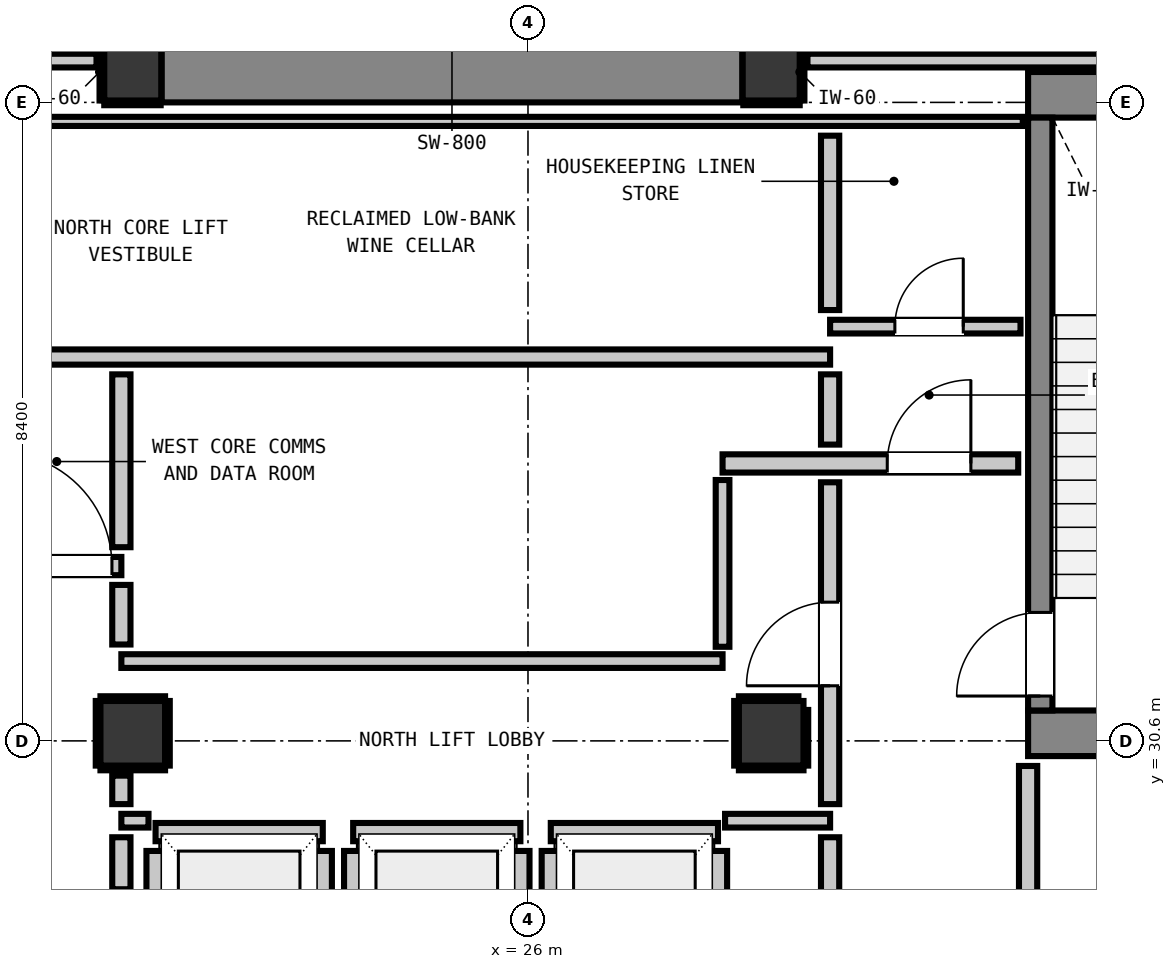
"""IFC4 building model, lengths in metres.
Left out: names, types, materials, properties, quantities, classifications, styles, units other than length and angle.
Written with IfcOpenShell. Run it as: python <this file> out.ifc"""

import sys

from ifc_helpers import new_model, si_unit, direction, frame, frame_2d, origin, origin_2d, place, context, subcontext, project, spatial, rectangle, extrude, element, fill, save


model = new_model("IFC4")
c1 = context("Model", 3, precision=1e-05, world=origin(), true_north=direction((0.0, 1.0)))
c2 = subcontext(c1, "Body", "Model", "MODEL_VIEW")
j1 = project(units=[si_unit("LENGTHUNIT", "METRE"), si_unit("PLANEANGLEUNIT", "RADIAN")], contexts=[c1])
p1 = place(None, origin())
s1 = spatial("IfcSite", under=j1, at=p1, CompositionType="ELEMENT")
p2 = place(p1, origin())
s2 = spatial("IfcBuilding", under=s1, at=p2, CompositionType="ELEMENT")
p3 = place(p2, frame((0.0, 0.0, 172.48)))
s3 = spatial("IfcBuildingStorey", under=s2, at=p3, CompositionType="ELEMENT", Elevation=172.48)
for number, where, z_axis, x_axis in (
    (1, (20.8, 39.4, 0.0), (0.0, 0.0, 1.0), (1.0, 0.0, 0.0)),
    (2, (29.2, 39.4, 0.0), (0.0, 0.0, 1.0), (1.0, 0.0, 0.0)),
):
    element("IfcColumn", number, at=place(p3, frame(where, z_axis=z_axis, x_axis=x_axis)), inside=s3, PredefinedType="COLUMN", context=c2, shape_type="SweptSolid", body=[
        extrude(rectangle(XDim=0.75, YDim=0.75, at=origin_2d()), origin(), (0.0, 0.0, 1.0), 4.4),
    ])
p4 = place(p3, frame((32.58, 39.1, 0.0), z_axis=(0.0, 0.0, 1.0), x_axis=(1.0, 0.0, 0.0)))
e3 = element("IfcWall", 3, at=p4, inside=s3, PredefinedType="SHEAR", context=c2, shape_type="SweptSolid", body=[
    extrude(rectangle(XDim=4.08, YDim=0.6, at=frame_2d((2.04, 0.0))), origin(), (0.0, 0.0, 1.0), 4.4),
])
p5 = place(p3, frame((32.58, 30.7, 0.0), z_axis=(0.0, 0.0, 1.0), x_axis=(1.0, 0.0, 0.0)))
e4 = element("IfcWall", 4, at=p5, inside=s3, PredefinedType="SHEAR", context=c2, shape_type="SweptSolid", body=[
    extrude(rectangle(XDim=3.54, YDim=0.6, at=frame_2d((1.77, 0.0))), origin(), (0.0, 0.0, 1.0), 4.4),
])
p6 = place(p3, frame((21.18, 39.4, 0.0), z_axis=(0.0, 0.0, 1.0), x_axis=(1.0, 0.0, 0.0)))
e5 = element("IfcWall", 5, at=p6, inside=s3, PredefinedType="SHEAR", context=c2, shape_type="SweptSolid", body=[
    extrude(rectangle(XDim=7.64, YDim=0.8, at=frame_2d((3.82, 0.0))), origin(), (0.0, 0.0, 1.0), 4.4),
])
p7 = place(p3, frame((32.74, 31.0, 0.0), z_axis=(0.0, 0.0, 1.0), x_axis=(0.0, 1.0, 0.0)))
e6 = element("IfcWall", 6, at=p7, inside=s3, PredefinedType="SHEAR", context=c2, shape_type="SweptSolid", body=[
    extrude(rectangle(XDim=7.8, YDim=0.32, at=frame_2d((3.9, 0.0))), origin(), (0.0, 0.0, 1.0), 4.4),
])
p8 = place(p7, frame((0.19, 0.0, 0.0)))
e7 = element("IfcOpeningElement", 7, at=p8, cuts=e6, PredefinedType="OPENING", context=c2, shape_type="SweptSolid", body=[
    extrude(rectangle(XDim=1.1, YDim=2.15, at=frame_2d((0.55, 1.075))), frame((0.0, 0.17, 0.0), z_axis=(0.0, -1.0, 0.0), x_axis=(1.0, 0.0, 0.0)), (0.0, 0.0, 1.0), 0.34),
])
for number, where, z_axis, x_axis in (
    (8, (20.8, 30.7, 0.0), (0.0, 0.0, 1.0), (1.0, 0.0, 0.0)),
    (9, (29.2, 30.7, 0.0), (0.0, 0.0, 1.0), (1.0, 0.0, 0.0)),
):
    element("IfcColumn", number, at=place(p3, frame(where, z_axis=z_axis, x_axis=x_axis)), inside=s3, PredefinedType="COLUMN", context=c2, shape_type="SweptSolid", body=[
        extrude(rectangle(XDim=0.85, YDim=0.85, at=origin_2d()), origin(), (0.0, 0.0, 1.0), 4.4),
    ])
p9 = place(p3, frame((21.1, 29.4, 0.0), z_axis=(0.0, 0.0, 1.0), x_axis=(1.0, 0.0, 0.0)))
e10 = element("IfcWall", 10, at=p9, inside=s3, PredefinedType="PARTITIONING", context=c2, shape_type="SweptSolid", body=[
    extrude(rectangle(XDim=2.2, YDim=0.24, at=frame_2d((1.1, 0.0))), origin(), (0.0, 0.0, 1.0), 4.16),
])
p10 = place(p3, frame((21.1, 27.048, 0.0), z_axis=(0.0, 0.0, 1.0), x_axis=(0.0, 1.0, 0.0)))
e11 = element("IfcWall", 11, at=p10, inside=s3, PredefinedType="PARTITIONING", context=c2, shape_type="SweptSolid", body=[
    extrude(rectangle(XDim=2.104, YDim=0.24, at=frame_2d((1.052, 0.0))), origin(), (0.0, 0.0, 1.0), 3.395),
])
p11 = place(p3, frame((23.3, 27.048, 0.0), z_axis=(0.0, 0.0, 1.0), x_axis=(0.0, 1.0, 0.0)))
e12 = element("IfcWall", 12, at=p11, inside=s3, PredefinedType="PARTITIONING", context=c2, shape_type="SweptSolid", body=[
    extrude(rectangle(XDim=2.104, YDim=0.24, at=frame_2d((1.052, 0.0))), origin(), (0.0, 0.0, 1.0), 4.16),
])
p12 = place(p3, frame((23.7, 29.4, 0.0), z_axis=(0.0, 0.0, 1.0), x_axis=(1.0, 0.0, 0.0)))
e13 = element("IfcWall", 13, at=p12, inside=s3, PredefinedType="PARTITIONING", context=c2, shape_type="SweptSolid", body=[
    extrude(rectangle(XDim=2.2, YDim=0.24, at=frame_2d((1.1, 0.0))), origin(), (0.0, 0.0, 1.0), 4.16),
])
for number, where, z_axis, x_axis in (
    (14, (23.7, 27.048, 0.0), (0.0, 0.0, 1.0), (0.0, 1.0, 0.0)),
    (15, (25.9, 27.048, 0.0), (0.0, 0.0, 1.0), (0.0, 1.0, 0.0)),
):
    element("IfcWall", number, at=place(p3, frame(where, z_axis=z_axis, x_axis=x_axis)), inside=s3, PredefinedType="PARTITIONING", context=c2, shape_type="SweptSolid", body=[
        extrude(rectangle(XDim=2.104, YDim=0.24, at=frame_2d((1.052, 0.0))), origin(), (0.0, 0.0, 1.0), 4.16),
    ])
p13 = place(p3, frame((26.3, 29.4, 0.0), z_axis=(0.0, 0.0, 1.0), x_axis=(1.0, 0.0, 0.0)))
e16 = element("IfcWall", 16, at=p13, inside=s3, PredefinedType="PARTITIONING", context=c2, shape_type="SweptSolid", body=[
    extrude(rectangle(XDim=2.2, YDim=0.24, at=frame_2d((1.1, 0.0))), origin(), (0.0, 0.0, 1.0), 4.16),
])
p14 = place(p3, frame((26.3, 27.048, 0.0), z_axis=(0.0, 0.0, 1.0), x_axis=(0.0, 1.0, 0.0)))
e17 = element("IfcWall", 17, at=p14, inside=s3, PredefinedType="PARTITIONING", context=c2, shape_type="SweptSolid", body=[
    extrude(rectangle(XDim=2.104, YDim=0.24, at=frame_2d((1.052, 0.0))), origin(), (0.0, 0.0, 1.0), 4.16),
])
p15 = place(p3, frame((28.5, 27.33, 0.0), z_axis=(0.0, 0.0, 1.0), x_axis=(0.0, 1.0, 0.0)))
e18 = element("IfcWall", 18, at=p15, inside=s3, PredefinedType="PARTITIONING", context=c2, shape_type="SweptSolid", body=[
    extrude(rectangle(XDim=1.822, YDim=0.24, at=frame_2d((0.911, 0.0))), origin(), (0.0, 0.0, 1.0), 4.16),
])
p16 = place(p3, frame((17.45, 32.9, 0.0), z_axis=(0.0, 0.0, 1.0), x_axis=(1.0, 0.0, 0.0)))
e19 = element("IfcWall", 19, at=p16, inside=s3, PredefinedType="PARTITIONING", context=c2, shape_type="SweptSolid", body=[
    extrude(rectangle(XDim=3.2, YDim=0.24, at=frame_2d((1.6, 0.0))), origin(), (0.0, 0.0, 1.0), 4.16),
])
p17 = place(p16, frame((0.159, 0.0, 0.0)))
e20 = element("IfcOpeningElement", 20, at=p17, cuts=e19, PredefinedType="OPENING", context=c2, shape_type="SweptSolid", body=[
    extrude(rectangle(XDim=1.1, YDim=2.15, at=frame_2d((0.55, 1.075))), frame((0.0, 0.13, 0.0), z_axis=(0.0, -1.0, 0.0), x_axis=(1.0, 0.0, 0.0)), (0.0, 0.0, 1.0), 0.26),
])
p18 = place(p16, frame((1.576, 0.0, 0.0)))
e21 = element("IfcOpeningElement", 21, at=p18, cuts=e19, PredefinedType="OPENING", context=c2, shape_type="SweptSolid", body=[
    extrude(rectangle(XDim=1.5, YDim=2.15, at=frame_2d((0.75, 1.075))), frame((0.0, 0.13, 0.0), z_axis=(0.0, -1.0, 0.0), x_axis=(1.0, 0.0, 0.0)), (0.0, 0.0, 1.0), 0.26),
])
p19 = place(p3, frame((28.56, 34.25, 0.0), z_axis=(0.0, 0.0, 1.0), x_axis=(1.0, 0.0, 0.0)))
e22 = element("IfcWall", 22, at=p19, inside=s3, PredefinedType="PARTITIONING", context=c2, shape_type="SweptSolid", body=[
    extrude(rectangle(XDim=3.89, YDim=0.24, at=frame_2d((1.945, 0.0))), origin(), (0.0, 0.0, 1.0), 4.16),
])
p20 = place(p19, frame((2.167, 0.0, 0.0)))
e23 = element("IfcOpeningElement", 23, at=p20, cuts=e22, PredefinedType="OPENING", context=c2, shape_type="SweptSolid", body=[
    extrude(rectangle(XDim=1.1, YDim=2.15, at=frame_2d((0.55, 1.075))), frame((0.0, 0.13, 0.0), z_axis=(0.0, -1.0, 0.0), x_axis=(1.0, 0.0, 0.0)), (0.0, 0.0, 1.0), 0.26),
])
p21 = place(p3, frame((18.95, 35.65, 0.0), z_axis=(0.0, 0.0, 1.0), x_axis=(1.0, 0.0, 0.0)))
e24 = element("IfcWall", 24, at=p21, inside=s3, PredefinedType="PARTITIONING", context=c2, shape_type="SweptSolid", body=[
    extrude(rectangle(XDim=11.025, YDim=0.2, at=frame_2d((5.513, 0.0))), origin(), (0.0, 0.0, 1.0), 4.16),
])
p22 = place(p3, frame((20.65, 29.55, 0.0), z_axis=(0.0, 0.0, 1.0), x_axis=(1.0, 0.0, 0.0)))
e25 = element("IfcWall", 25, at=p22, inside=s3, PredefinedType="PARTITIONING", context=c2, shape_type="SweptSolid", body=[
    extrude(rectangle(XDim=0.357, YDim=0.18, at=frame_2d((0.179, 0.0))), origin(), (0.0, 0.0, 1.0), 4.16),
])
p23 = place(p3, frame((28.593, 29.55, 0.0), z_axis=(0.0, 0.0, 1.0), x_axis=(1.0, 0.0, 0.0)))
e26 = element("IfcWall", 26, at=p23, inside=s3, PredefinedType="PARTITIONING", context=c2, shape_type="SweptSolid", body=[
    extrude(rectangle(XDim=1.382, YDim=0.18, at=frame_2d((0.691, 0.0))), origin(), (0.0, 0.0, 1.0), 4.16),
])
p24 = place(p3, frame((20.65, 31.65, 0.0), z_axis=(0.0, 0.0, 1.0), x_axis=(1.0, 0.0, 0.0)))
e27 = element("IfcWall", 27, at=p24, inside=s3, PredefinedType="PARTITIONING", context=c2, shape_type="SweptSolid", body=[
    extrude(rectangle(XDim=7.91, YDim=0.18, at=frame_2d((3.955, 0.0))), origin(), (0.0, 0.0, 1.0), 4.16),
])
p25 = place(p3, frame((29.975, 36.05, 0.0), z_axis=(0.0, 0.0, 1.0), x_axis=(1.0, 0.0, 0.0)))
e28 = element("IfcWall", 28, at=p25, inside=s3, PredefinedType="PARTITIONING", context=c2, shape_type="SweptSolid", body=[
    extrude(rectangle(XDim=2.505, YDim=0.18, at=frame_2d((1.252, 0.0))), origin(), (0.0, 0.0, 1.0), 4.16),
])
p26 = place(p25, frame((0.852, 0.0, 0.0)))
e29 = element("IfcOpeningElement", 29, at=p26, cuts=e28, PredefinedType="OPENING", context=c2, shape_type="SweptSolid", body=[
    extrude(rectangle(XDim=0.9, YDim=2.1, at=frame_2d((0.45, 1.05))), frame((0.0, 0.1, 0.0), z_axis=(0.0, -1.0, 0.0), x_axis=(1.0, 0.0, 0.0)), (0.0, 0.0, 1.0), 0.2),
])
p27 = place(p3, frame((10.8, 39.55, 0.0), z_axis=(0.0, 0.0, 1.0), x_axis=(1.0, 0.0, 0.0)))
e30 = element("IfcWall", 30, at=p27, inside=s3, PredefinedType="PARTITIONING", context=c2, shape_type="SweptSolid", body=[
    extrude(rectangle(XDim=9.523, YDim=0.18, at=frame_2d((4.761, 0.0))), origin(), (0.0, 0.0, 1.0), 3.842),
])
p28 = place(p27, frame((6.635, 0.0, 0.0)))
e31 = element("IfcOpeningElement", 31, at=p28, cuts=e30, PredefinedType="OPENING", context=c2, shape_type="SweptSolid", body=[
    extrude(rectangle(XDim=1.4, YDim=2.15, at=frame_2d((0.7, 1.075))), frame((0.0, 0.1, 0.0), z_axis=(0.0, -1.0, 0.0), x_axis=(1.0, 0.0, 0.0)), (0.0, 0.0, 1.0), 0.2),
])
p29 = place(p27, frame((0.199, 0.0, 0.0)))
e32 = element("IfcOpeningElement", 32, at=p29, cuts=e30, PredefinedType="OPENING", context=c2, shape_type="SweptSolid", body=[
    extrude(rectangle(XDim=1.4, YDim=2.15, at=frame_2d((0.7, 1.075))), frame((0.0, 0.1, 0.0), z_axis=(0.0, -1.0, 0.0), x_axis=(1.0, 0.0, 0.0)), (0.0, 0.0, 1.0), 0.2),
])
p30 = place(p3, frame((29.677, 39.55, 0.0), z_axis=(0.0, 0.0, 1.0), x_axis=(1.0, 0.0, 0.0)))
e33 = element("IfcWall", 33, at=p30, inside=s3, PredefinedType="PARTITIONING", context=c2, shape_type="SweptSolid", body=[
    extrude(rectangle(XDim=9.423, YDim=0.18, at=frame_2d((4.711, 0.0))), origin(), (0.0, 0.0, 1.0), 3.842),
])
p31 = place(p30, frame((7.824, 0.0, 0.0)))
e34 = element("IfcOpeningElement", 34, at=p31, cuts=e33, PredefinedType="OPENING", context=c2, shape_type="SweptSolid", body=[
    extrude(rectangle(XDim=1.4, YDim=2.15, at=frame_2d((0.7, 1.075))), frame((0.0, 0.1, 0.0), z_axis=(0.0, -1.0, 0.0), x_axis=(1.0, 0.0, 0.0)), (0.0, 0.0, 1.0), 0.2),
])
p32 = place(p3, frame((18.95, 38.75, 0.0), z_axis=(0.0, 0.0, 1.0), x_axis=(1.0, 0.0, 0.0)))
e35 = element("IfcWall", 35, at=p32, inside=s3, PredefinedType="PARTITIONING", context=c2, shape_type="SweptSolid", body=[
    extrude(rectangle(XDim=13.56, YDim=0.12, at=frame_2d((6.78, 0.0))), origin(), (0.0, 0.0, 1.0), 4.16),
])
p33 = place(p3, frame((20.65, 28.648, 0.0), z_axis=(0.0, 0.0, 1.0), x_axis=(0.0, 1.0, 0.0)))
e36 = element("IfcWall", 36, at=p33, inside=s3, PredefinedType="PARTITIONING", context=c2, shape_type="SweptSolid", body=[
    extrude(rectangle(XDim=0.684, YDim=0.24, at=frame_2d((0.342, 0.0))), origin(), (0.0, 0.0, 1.0), 3.395),
])
p34 = place(p3, frame((20.65, 29.768, 0.0), z_axis=(0.0, 0.0, 1.0), x_axis=(0.0, 1.0, 0.0)))
e37 = element("IfcWall", 37, at=p34, inside=s3, PredefinedType="PARTITIONING", context=c2, shape_type="SweptSolid", body=[
    extrude(rectangle(XDim=0.375, YDim=0.24, at=frame_2d((0.188, 0.0))), origin(), (0.0, 0.0, 1.0), 3.395),
])
p35 = place(p3, frame((20.65, 31.868, 0.0), z_axis=(0.0, 0.0, 1.0), x_axis=(0.0, 1.0, 0.0)))
e38 = element("IfcWall", 38, at=p35, inside=s3, PredefinedType="PARTITIONING", context=c2, shape_type="SweptSolid", body=[
    extrude(rectangle(XDim=0.784, YDim=0.24, at=frame_2d((0.392, 0.0))), origin(), (0.0, 0.0, 1.0), 3.395),
])
p36 = place(p3, frame((20.65, 33.148, 0.0), z_axis=(0.0, 0.0, 1.0), x_axis=(0.0, 1.0, 0.0)))
e39 = element("IfcWall", 39, at=p36, inside=s3, PredefinedType="PARTITIONING", context=c2, shape_type="SweptSolid", body=[
    extrude(rectangle(XDim=2.274, YDim=0.24, at=frame_2d((1.137, 0.0))), origin(), (0.0, 0.0, 1.0), 3.395),
])
p37 = place(p3, frame((29.975, 25.648, 0.0), z_axis=(0.0, 0.0, 1.0), x_axis=(0.0, 1.0, 0.0)))
e40 = element("IfcWall", 40, at=p37, inside=s3, PredefinedType="PARTITIONING", context=c2, shape_type="SweptSolid", body=[
    extrude(rectangle(XDim=3.684, YDim=0.24, at=frame_2d((1.842, 0.0))), origin(), (0.0, 0.0, 1.0), 4.16),
])
p38 = place(p3, frame((29.975, 29.768, 0.0), z_axis=(0.0, 0.0, 1.0), x_axis=(0.0, 1.0, 0.0)))
e41 = element("IfcWall", 41, at=p38, inside=s3, PredefinedType="PARTITIONING", context=c2, shape_type="SweptSolid", body=[
    extrude(rectangle(XDim=4.234, YDim=0.24, at=frame_2d((2.117, 0.0))), origin(), (0.0, 0.0, 1.0), 4.16),
])
p39 = place(p38, frame((1.557, 0.0, 0.0)))
e42 = element("IfcOpeningElement", 42, at=p39, cuts=e41, PredefinedType="OPENING", context=c2, shape_type="SweptSolid", body=[
    extrude(rectangle(XDim=1.1, YDim=2.15, at=frame_2d((0.55, 1.075))), frame((0.0, 0.13, 0.0), z_axis=(0.0, -1.0, 0.0), x_axis=(1.0, 0.0, 0.0)), (0.0, 0.0, 1.0), 0.26),
])
p40 = place(p3, frame((29.975, 34.498, 0.0), z_axis=(0.0, 0.0, 1.0), x_axis=(0.0, 1.0, 0.0)))
e43 = element("IfcWall", 43, at=p40, inside=s3, PredefinedType="PARTITIONING", context=c2, shape_type="SweptSolid", body=[
    extrude(rectangle(XDim=0.924, YDim=0.24, at=frame_2d((0.462, 0.0))), origin(), (0.0, 0.0, 1.0), 4.16),
])
p41 = place(p3, frame((29.975, 36.268, 0.0), z_axis=(0.0, 0.0, 1.0), x_axis=(0.0, 1.0, 0.0)))
e44 = element("IfcWall", 44, at=p41, inside=s3, PredefinedType="PARTITIONING", context=c2, shape_type="SweptSolid", body=[
    extrude(rectangle(XDim=2.294, YDim=0.24, at=frame_2d((1.147, 0.0))), origin(), (0.0, 0.0, 1.0), 4.16),
])
p42 = place(p3, frame((32.58, 25.648, 0.0), z_axis=(0.0, 0.0, 1.0), x_axis=(0.0, 1.0, 0.0)))
e45 = element("IfcWall", 45, at=p42, inside=s3, PredefinedType="PARTITIONING", context=c2, shape_type="SweptSolid", body=[
    extrude(rectangle(XDim=4.622, YDim=0.24, at=frame_2d((2.311, 0.0))), origin(), (0.0, 0.0, 1.0), 4.16),
])
p43 = place(p3, frame((28.56, 31.838, 0.0), z_axis=(0.0, 0.0, 1.0), x_axis=(0.0, 1.0, 0.0)))
e46 = element("IfcWall", 46, at=p43, inside=s3, PredefinedType="PARTITIONING", context=c2, shape_type="SweptSolid", body=[
    extrude(rectangle(XDim=2.194, YDim=0.18, at=frame_2d((1.097, 0.0))), origin(), (0.0, 0.0, 1.0), 4.16),
])
p44 = place(p3, frame((20.425, 38.993, 0.0), z_axis=(0.0, 0.0, 1.0), x_axis=(1.0, 0.0, 0.0)))
e47 = element("IfcWall", 47, at=p44, inside=s3, PredefinedType="PARTITIONING", context=c2, shape_type="SweptSolid", body=[
    extrude(rectangle(XDim=0.742, YDim=0.06, at=frame_2d((0.371, 0.0))), origin(), (0.0, 0.0, 1.0), 1.45),
])
p45 = place(p3, frame((20.393, 39.025, 0.0), z_axis=(0.0, 0.0, 1.0), x_axis=(0.0, 1.0, 0.0)))
e48 = element("IfcWall", 48, at=p45, inside=s3, PredefinedType="PARTITIONING", context=c2, shape_type="SweptSolid", body=[
    extrude(rectangle(XDim=0.75, YDim=0.06, at=frame_2d((0.375, 0.0))), origin(), (0.0, 0.0, 1.0), 1.45),
])
p46 = place(p3, frame((28.833, 38.993, 0.0), z_axis=(0.0, 0.0, 1.0), x_axis=(1.0, 0.0, 0.0)))
e49 = element("IfcWall", 49, at=p46, inside=s3, PredefinedType="PARTITIONING", context=c2, shape_type="SweptSolid", body=[
    extrude(rectangle(XDim=0.742, YDim=0.06, at=frame_2d((0.371, 0.0))), origin(), (0.0, 0.0, 1.0), 1.45),
])
p47 = place(p3, frame((29.607, 39.025, 0.0), z_axis=(0.0, 0.0, 1.0), x_axis=(0.0, 1.0, 0.0)))
e50 = element("IfcWall", 50, at=p47, inside=s3, PredefinedType="PARTITIONING", context=c2, shape_type="SweptSolid", body=[
    extrude(rectangle(XDim=0.75, YDim=0.06, at=frame_2d((0.375, 0.0))), origin(), (0.0, 0.0, 1.0), 1.45),
])
for number, where, z_axis, x_axis in (
    (51, (20.375, 30.243, 0.0), (0.0, 0.0, 1.0), (1.0, 0.0, 0.0)),
    (52, (20.375, 31.157, 0.0), (0.0, 0.0, 1.0), (1.0, 0.0, 0.0)),
    (53, (20.343, 30.275, 0.0), (0.0, 0.0, 1.0), (0.0, 1.0, 0.0)),
    (54, (21.257, 30.275, 0.0), (0.0, 0.0, 1.0), (0.0, 1.0, 0.0)),
    (55, (28.775, 30.243, 0.0), (0.0, 0.0, 1.0), (1.0, 0.0, 0.0)),
):
    element("IfcWall", number, at=place(p3, frame(where, z_axis=z_axis, x_axis=x_axis)), inside=s3, PredefinedType="PARTITIONING", context=c2, shape_type="SweptSolid", body=[
        extrude(rectangle(XDim=0.85, YDim=0.06, at=frame_2d((0.425, 0.0))), origin(), (0.0, 0.0, 1.0), 1.45),
    ])
p48 = place(p3, frame((28.775, 31.157, 0.0), z_axis=(0.0, 0.0, 1.0), x_axis=(1.0, 0.0, 0.0)))
e56 = element("IfcWall", 56, at=p48, inside=s3, PredefinedType="PARTITIONING", context=c2, shape_type="SweptSolid", body=[
    extrude(rectangle(XDim=0.783, YDim=0.06, at=frame_2d((0.392, 0.0))), origin(), (0.0, 0.0, 1.0), 1.45),
])
p49 = place(p3, frame((28.743, 30.275, 0.0), z_axis=(0.0, 0.0, 1.0), x_axis=(0.0, 1.0, 0.0)))
e57 = element("IfcWall", 57, at=p49, inside=s3, PredefinedType="PARTITIONING", context=c2, shape_type="SweptSolid", body=[
    extrude(rectangle(XDim=0.85, YDim=0.06, at=frame_2d((0.425, 0.0))), origin(), (0.0, 0.0, 1.0), 1.45),
])
p50 = place(p3, frame((29.657, 30.275, 0.0), z_axis=(0.0, 0.0, 1.0), x_axis=(0.0, 1.0, 0.0)))
e58 = element("IfcWall", 58, at=p50, inside=s3, PredefinedType="PARTITIONING", context=c2, shape_type="SweptSolid", body=[
    extrude(rectangle(XDim=0.732, YDim=0.06, at=frame_2d((0.366, 0.0))), origin(), (0.0, 0.0, 1.0), 1.45),
])
p51 = place(p8, origin())
e59 = element("IfcDoor", 59, at=p51, inside=s3, OperationType="SINGLE_SWING_LEFT", PredefinedType="DOOR", context=c2, shape_type="SweptSolid", body=[
    extrude(rectangle(XDim=1.1, YDim=2.15, at=frame_2d((0.55, 1.075))), frame((0.0, 0.025, 0.0), z_axis=(0.0, -1.0, 0.0), x_axis=(1.0, 0.0, 0.0)), (0.0, 0.0, 1.0), 0.05),
])
fill(e7, e59)
p52 = place(p39, origin())
e60 = element("IfcDoor", 60, at=p52, inside=s3, OperationType="SINGLE_SWING_LEFT", PredefinedType="DOOR", context=c2, shape_type="SweptSolid", body=[
    extrude(rectangle(XDim=1.1, YDim=2.15, at=frame_2d((0.55, 1.075))), frame((0.0, 0.025, 0.0), z_axis=(0.0, -1.0, 0.0), x_axis=(1.0, 0.0, 0.0)), (0.0, 0.0, 1.0), 0.05),
])
fill(e42, e60)
p53 = place(p20, origin())
e61 = element("IfcDoor", 61, at=p53, inside=s3, OperationType="SINGLE_SWING_RIGHT", PredefinedType="DOOR", context=c2, shape_type="SweptSolid", body=[
    extrude(rectangle(XDim=1.1, YDim=2.15, at=frame_2d((0.55, 1.075))), frame((0.0, 0.025, 0.0), z_axis=(0.0, -1.0, 0.0), x_axis=(1.0, 0.0, 0.0)), (0.0, 0.0, 1.0), 0.05),
])
fill(e23, e61)
p54 = place(p18, origin())
e62 = element("IfcDoor", 62, at=p54, inside=s3, OperationType="SINGLE_SWING_LEFT", PredefinedType="DOOR", context=c2, shape_type="SweptSolid", body=[
    extrude(rectangle(XDim=1.5, YDim=2.15, at=frame_2d((0.75, 1.075))), frame((0.0, 0.025, 0.0), z_axis=(0.0, -1.0, 0.0), x_axis=(1.0, 0.0, 0.0)), (0.0, 0.0, 1.0), 0.05),
])
fill(e21, e62)
p55 = place(p26, origin())
e63 = element("IfcDoor", 63, at=p55, inside=s3, OperationType="SINGLE_SWING_RIGHT", PredefinedType="DOOR", context=c2, shape_type="SweptSolid", body=[
    extrude(rectangle(XDim=0.9, YDim=2.1, at=frame_2d((0.45, 1.05))), frame((0.0, 0.025, 0.0), z_axis=(0.0, -1.0, 0.0), x_axis=(1.0, 0.0, 0.0)), (0.0, 0.0, 1.0), 0.05),
])
fill(e29, e63)
save(model, sys.argv[1])
